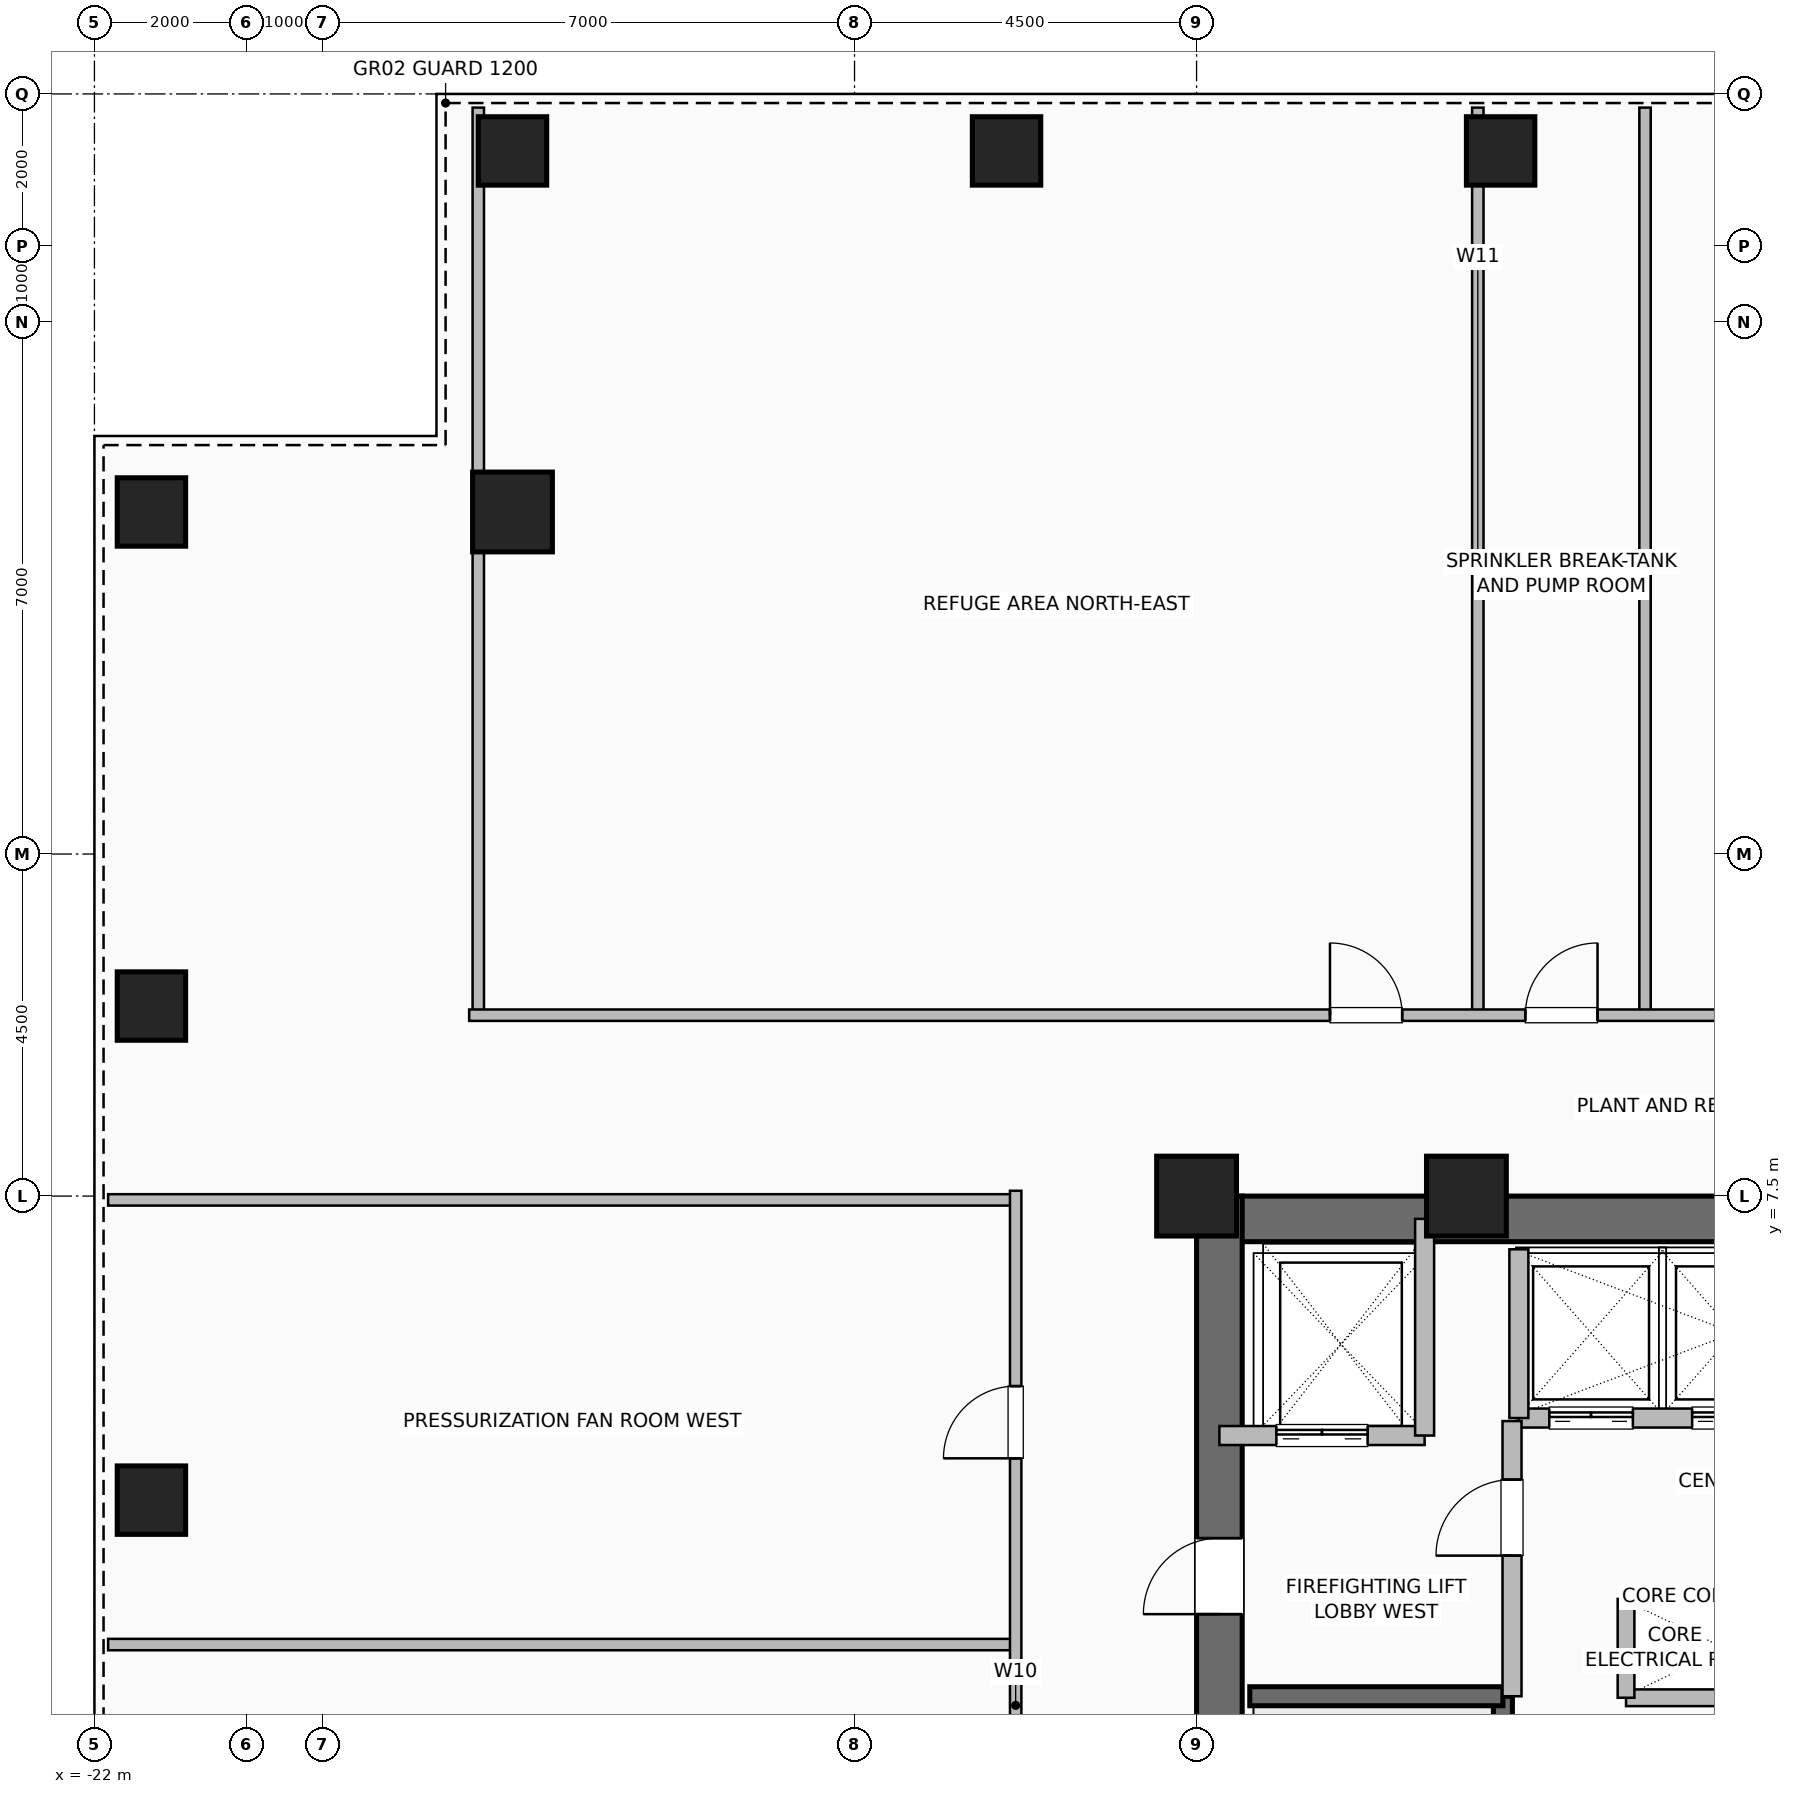
"""IFC4 building model, lengths in metres.
Left out: names, types, materials, properties, quantities, classifications, styles, units other than length and angle.
Written with IfcOpenShell. Run it as: python <this file> out.ifc"""

import sys

from ifc_helpers import new_model, si_unit, direction, frame, frame_2d, origin, origin_2d, place, context, subcontext, project, spatial, rectangle, hollow_rectangle, extrude, element, fill, save


model = new_model("IFC4")
c1 = context("Model", 3, precision=1e-05, world=origin(), true_north=direction((0.0, 1.0)))
c2 = subcontext(c1, "Body", "Model", "MODEL_VIEW")
j1 = project(units=[si_unit("LENGTHUNIT", "METRE"), si_unit("PLANEANGLEUNIT", "RADIAN")], contexts=[c1])
p1 = place(None, origin())
s1 = spatial("IfcSite", under=j1, at=p1, CompositionType="ELEMENT")
p2 = place(p1, origin())
s2 = spatial("IfcBuilding", under=s1, at=p2, CompositionType="ELEMENT")
p3 = place(p2, frame((0.0, 0.0, 160.2)))
s3 = spatial("IfcBuildingStorey", under=s2, at=p3, CompositionType="ELEMENT", Elevation=160.2)
for number, where, z_axis, x_axis in (
    (1, (-3.95, 7.5, 0.0), (0.0, 0.0, 1.0), (1.0, 0.0, 0.0)),
    (2, (-7.5, 7.5, 0.0), (0.0, 0.0, 1.0), (1.0, 0.0, 0.0)),
):
    element("IfcColumn", number, at=place(p3, frame(where, z_axis=z_axis, x_axis=x_axis)), inside=s3, PredefinedType="COLUMN", context=c2, shape_type="SweptSolid", body=[
        extrude(hollow_rectangle(XDim=1.05, YDim=1.05, WallThickness=0.05, at=origin_2d()), origin(), (0.0, 0.0, 1.0), 6.0),
    ])
for number, where, z_axis, x_axis in (
    (3, (-16.5, 21.25, 0.0), (0.0, 0.0, 1.0), (1.0, 0.0, 0.0)),
    (4, (-10.0, 21.25, 0.0), (0.0, 0.0, 1.0), (1.0, 0.0, 0.0)),
    (5, (-3.5, 21.25, 0.0), (0.0, 0.0, 1.0), (1.0, 0.0, 0.0)),
    (6, (-21.25, 3.5, 0.0), (0.0, 0.0, 1.0), (1.0, 0.0, 0.0)),
    (7, (-21.25, 10.0, 0.0), (0.0, 0.0, 1.0), (1.0, 0.0, 0.0)),
    (8, (-21.25, 16.5, 0.0), (0.0, 0.0, 1.0), (1.0, 0.0, 0.0)),
):
    element("IfcColumn", number, at=place(p3, frame(where, z_axis=z_axis, x_axis=x_axis)), inside=s3, PredefinedType="COLUMN", context=c2, shape_type="SweptSolid", body=[
        extrude(hollow_rectangle(XDim=0.9, YDim=0.9, WallThickness=0.045, at=origin_2d()), origin(), (0.0, 0.0, 1.0), 5.6),
    ])
p4 = place(p3, frame((-16.5, 16.5, 0.0), z_axis=(0.0, 0.0, 1.0), x_axis=(1.0, 0.0, 0.0)))
e9 = element("IfcColumn", 9, at=p4, inside=s3, PredefinedType="COLUMN", context=c2, shape_type="SweptSolid", body=[
    extrude(hollow_rectangle(XDim=1.05, YDim=1.05, WallThickness=0.05, at=origin_2d()), origin(), (0.0, 0.0, 1.0), 5.6),
])
p5 = place(p3, frame((-7.5, 7.2, 0.0), z_axis=(0.0, 0.0, 1.0), x_axis=(1.0, 0.0, 0.0)))
e10 = element("IfcWall", 10, at=p5, inside=s3, PredefinedType="SHEAR", context=c2, shape_type="SweptSolid", body=[
    extrude(rectangle(XDim=15.0, YDim=0.6, at=frame_2d((7.5, 0.0))), origin(), (0.0, 0.0, 1.0), 5.6),
])
p6 = place(p3, frame((-7.2, -7.5, 0.0), z_axis=(0.0, 0.0, 1.0), x_axis=(0.0, 1.0, 0.0)))
e11 = element("IfcWall", 11, at=p6, inside=s3, PredefinedType="SHEAR", context=c2, shape_type="SweptSolid", body=[
    extrude(rectangle(XDim=15.0, YDim=0.6, at=frame_2d((7.5, 0.0))), origin(), (0.0, 0.0, 1.0), 5.6),
])
p7 = place(p6, frame((9.5, 0.0, 0.0)))
e12 = element("IfcOpeningElement", 12, at=p7, cuts=e11, PredefinedType="OPENING", context=c2, shape_type="SweptSolid", body=[
    extrude(rectangle(XDim=1.0, YDim=2.08, at=frame_2d((0.5, 1.04))), frame((0.0, 0.31, 0.0), z_axis=(0.0, -1.0, 0.0), x_axis=(1.0, 0.0, 0.0)), (0.0, 0.0, 1.0), 0.62),
])
p8 = place(p3, frame((-3.47, -6.8, 0.0), z_axis=(0.0, 0.0, 1.0), x_axis=(0.0, 1.0, 0.0)))
e13 = element("IfcWall", 13, at=p8, inside=s3, PredefinedType="SHEAR", context=c2, shape_type="SweptSolid", body=[
    extrude(rectangle(XDim=7.72, YDim=0.25, at=frame_2d((3.86, 0.0))), origin(), (0.0, 0.0, 1.0), 5.6),
])
p9 = place(p3, frame((-6.8, 0.92, 0.0), z_axis=(0.0, 0.0, 1.0), x_axis=(1.0, 0.0, 0.0)))
e14 = element("IfcWall", 14, at=p9, inside=s3, PredefinedType="SHEAR", context=c2, shape_type="SweptSolid", body=[
    extrude(rectangle(XDim=3.33, YDim=0.25, at=frame_2d((1.665, 0.0))), origin(), (0.0, 0.0, 1.0), 5.6),
])
for number, where, z_axis, x_axis in (
    (15, (-1.85, 2.2, 0.0), (0.0, 0.0, 1.0), (1.0, 0.0, 0.0)),
    (16, (-1.85, 0.9, 0.0), (0.0, 0.0, 1.0), (1.0, 0.0, 0.0)),
):
    element("IfcWall", number, at=place(p3, frame(where, z_axis=z_axis, x_axis=x_axis)), inside=s3, PredefinedType="PARTITIONING", context=c2, shape_type="SweptSolid", body=[
        extrude(rectangle(XDim=2.6, YDim=0.22, at=frame_2d((1.3, 0.0))), origin(), (0.0, 0.0, 1.0), 5.6),
    ])
p10 = place(p3, frame((-1.85, 0.9, 0.0), z_axis=(0.0, 0.0, 1.0), x_axis=(0.0, 1.0, 0.0)))
e17 = element("IfcWall", 17, at=p10, inside=s3, PredefinedType="PARTITIONING", context=c2, shape_type="SweptSolid", body=[
    extrude(rectangle(XDim=1.3, YDim=0.22, at=frame_2d((0.65, 0.0))), origin(), (0.0, 0.0, 1.0), 5.6),
])
p11 = place(p3, frame((-3.26, 4.58, 0.0), z_axis=(0.0, 0.0, 1.0), x_axis=(1.0, 0.0, 0.0)))
e18 = element("IfcWall", 18, at=p11, inside=s3, PredefinedType="SHEAR", context=c2, shape_type="SweptSolid", body=[
    extrude(rectangle(XDim=5.64, YDim=0.25, at=frame_2d((2.82, 0.0))), origin(), (0.0, 0.0, 1.0), 5.6),
])
p12 = place(p11, frame((0.4, 0.0, 0.0)))
e19 = element("IfcOpeningElement", 19, at=p12, cuts=e18, PredefinedType="OPENING", context=c2, shape_type="SweptSolid", body=[
    extrude(rectangle(XDim=1.1, YDim=2.2, at=frame_2d((0.55, 1.1))), frame((0.0, 0.135, 0.0), z_axis=(0.0, -1.0, 0.0), x_axis=(1.0, 0.0, 0.0)), (0.0, 0.0, 1.0), 0.27),
])
p13 = place(p11, frame((2.28, 0.0, 0.0)))
e20 = element("IfcOpeningElement", 20, at=p13, cuts=e18, PredefinedType="OPENING", context=c2, shape_type="SweptSolid", body=[
    extrude(rectangle(XDim=1.1, YDim=2.2, at=frame_2d((0.55, 1.1))), frame((0.0, 0.135, 0.0), z_axis=(0.0, -1.0, 0.0), x_axis=(1.0, 0.0, 0.0)), (0.0, 0.0, 1.0), 0.27),
])
p14 = place(p11, frame((4.16, 0.0, 0.0)))
e21 = element("IfcOpeningElement", 21, at=p14, cuts=e18, PredefinedType="OPENING", context=c2, shape_type="SweptSolid", body=[
    extrude(rectangle(XDim=1.1, YDim=2.2, at=frame_2d((0.55, 1.1))), frame((0.0, 0.135, 0.0), z_axis=(0.0, -1.0, 0.0), x_axis=(1.0, 0.0, 0.0)), (0.0, 0.0, 1.0), 0.27),
])
p15 = place(p3, frame((-3.26, 4.58, 0.0), z_axis=(0.0, 0.0, 1.0), x_axis=(0.0, 1.0, 0.0)))
e22 = element("IfcWall", 22, at=p15, inside=s3, PredefinedType="SHEAR", context=c2, shape_type="SweptSolid", body=[
    extrude(rectangle(XDim=2.22, YDim=0.25, at=frame_2d((1.11, 0.0))), origin(), (0.0, 0.0, 1.0), 5.6),
])
p16 = place(p3, frame((-7.2, 4.35, 0.0), z_axis=(0.0, 0.0, 1.0), x_axis=(1.0, 0.0, 0.0)))
e23 = element("IfcWall", 23, at=p16, inside=s3, PredefinedType="SHEAR", context=c2, shape_type="SweptSolid", body=[
    extrude(rectangle(XDim=2.7, YDim=0.25, at=frame_2d((1.35, 0.0))), origin(), (0.0, 0.0, 1.0), 5.6),
])
p17 = place(p16, frame((0.75, 0.0, 0.0)))
e24 = element("IfcOpeningElement", 24, at=p17, cuts=e23, PredefinedType="OPENING", context=c2, shape_type="SweptSolid", body=[
    extrude(rectangle(XDim=1.2, YDim=2.2, at=frame_2d((0.6, 1.1))), frame((0.0, 0.135, 0.0), z_axis=(0.0, -1.0, 0.0), x_axis=(1.0, 0.0, 0.0)), (0.0, 0.0, 1.0), 0.27),
])
p18 = place(p3, frame((-4.5, 4.35, 0.0), z_axis=(0.0, 0.0, 1.0), x_axis=(0.0, 1.0, 0.0)))
e25 = element("IfcWall", 25, at=p18, inside=s3, PredefinedType="SHEAR", context=c2, shape_type="SweptSolid", body=[
    extrude(rectangle(XDim=2.85, YDim=0.25, at=frame_2d((1.425, 0.0))), origin(), (0.0, 0.0, 1.0), 5.6),
])
p19 = place(p3, frame((-3.35, 0.92, 0.0), z_axis=(0.0, 0.0, 1.0), x_axis=(0.0, 1.0, 0.0)))
e26 = element("IfcWall", 26, at=p19, inside=s3, PredefinedType="SHEAR", context=c2, shape_type="SweptSolid", body=[
    extrude(rectangle(XDim=3.62, YDim=0.25, at=frame_2d((1.81, 0.0))), origin(), (0.0, 0.0, 1.0), 5.6),
])
p20 = place(p19, frame((1.85, 0.0, 0.0)))
e27 = element("IfcOpeningElement", 27, at=p20, cuts=e26, PredefinedType="OPENING", context=c2, shape_type="SweptSolid", body=[
    extrude(rectangle(XDim=1.0, YDim=2.08, at=frame_2d((0.5, 1.04))), frame((0.0, 0.135, 0.0), z_axis=(0.0, -1.0, 0.0), x_axis=(1.0, 0.0, 0.0)), (0.0, 0.0, 1.0), 0.27),
])
for number, where, z_axis, x_axis in (
    (28, (-16.95, 9.88, 0.0), (0.0, 0.0, 1.0), (0.0, 1.0, 0.0)),
    (29, (-3.8, 9.88, 0.0), (0.0, 0.0, 1.0), (0.0, 1.0, 0.0)),
    (30, (-1.6, 9.88, 0.0), (0.0, 0.0, 1.0), (0.0, 1.0, 0.0)),
):
    element("IfcWall", number, at=place(p3, frame(where, z_axis=z_axis, x_axis=x_axis)), inside=s3, PredefinedType="PARTITIONING", context=c2, shape_type="SweptSolid", body=[
        extrude(rectangle(XDim=11.94, YDim=0.15, at=frame_2d((5.97, 0.0))), origin(), (0.0, 0.0, 1.0), 5.6),
    ])
p21 = place(p3, frame((-17.07, 9.88, 0.0), z_axis=(0.0, 0.0, 1.0), x_axis=(1.0, 0.0, 0.0)))
e31 = element("IfcWall", 31, at=p21, inside=s3, PredefinedType="PARTITIONING", context=c2, shape_type="SweptSolid", body=[
    extrude(rectangle(XDim=34.14, YDim=0.15, at=frame_2d((17.07, 0.0))), origin(), (0.0, 0.0, 1.0), 5.6),
])
p22 = place(p21, frame((11.325, 0.0, 0.0)))
e32 = element("IfcOpeningElement", 32, at=p22, cuts=e31, PredefinedType="OPENING", context=c2, shape_type="SweptSolid", body=[
    extrude(rectangle(XDim=0.95, YDim=2.06, at=frame_2d((0.475, 1.03))), frame((0.0, 0.085, 0.0), z_axis=(0.0, -1.0, 0.0), x_axis=(1.0, 0.0, 0.0)), (0.0, 0.0, 1.0), 0.17),
])
p23 = place(p21, frame((13.895, 0.0, 0.0)))
e33 = element("IfcOpeningElement", 33, at=p23, cuts=e31, PredefinedType="OPENING", context=c2, shape_type="SweptSolid", body=[
    extrude(rectangle(XDim=0.95, YDim=2.06, at=frame_2d((0.475, 1.03))), frame((0.0, 0.085, 0.0), z_axis=(0.0, -1.0, 0.0), x_axis=(1.0, 0.0, 0.0)), (0.0, 0.0, 1.0), 0.17),
])
p24 = place(p21, frame((19.045, 0.0, 0.0)))
e34 = element("IfcOpeningElement", 34, at=p24, cuts=e31, PredefinedType="OPENING", context=c2, shape_type="SweptSolid", body=[
    extrude(rectangle(XDim=0.95, YDim=2.06, at=frame_2d((0.475, 1.03))), frame((0.0, 0.085, 0.0), z_axis=(0.0, -1.0, 0.0), x_axis=(1.0, 0.0, 0.0)), (0.0, 0.0, 1.0), 0.17),
])
p25 = place(p3, frame((-21.82, 1.6, 0.0), z_axis=(0.0, 0.0, 1.0), x_axis=(1.0, 0.0, 0.0)))
e35 = element("IfcWall", 35, at=p25, inside=s3, PredefinedType="PARTITIONING", context=c2, shape_type="SweptSolid", body=[
    extrude(rectangle(XDim=11.94, YDim=0.15, at=frame_2d((5.97, 0.0))), origin(), (0.0, 0.0, 1.0), 5.6),
])
p26 = place(p3, frame((-21.82, 7.45, 0.0), z_axis=(0.0, 0.0, 1.0), x_axis=(1.0, 0.0, 0.0)))
e36 = element("IfcWall", 36, at=p26, inside=s3, PredefinedType="PARTITIONING", context=c2, shape_type="SweptSolid", body=[
    extrude(rectangle(XDim=11.94, YDim=0.15, at=frame_2d((5.97, 0.0))), origin(), (0.0, 0.0, 1.0), 3.975),
])
p27 = place(p3, frame((-9.88, -7.57, 0.0), z_axis=(0.0, 0.0, 1.0), x_axis=(0.0, 1.0, 0.0)))
e37 = element("IfcWall", 37, at=p27, inside=s3, PredefinedType="PARTITIONING", context=c2, shape_type="SweptSolid", body=[
    extrude(rectangle(XDim=15.14, YDim=0.15, at=frame_2d((7.57, 0.0))), origin(), (0.0, 0.0, 1.0), 5.6),
])
p28 = place(p27, frame((4.17, 0.0, 0.0)))
e38 = element("IfcOpeningElement", 38, at=p28, cuts=e37, PredefinedType="OPENING", context=c2, shape_type="SweptSolid", body=[
    extrude(rectangle(XDim=0.95, YDim=2.06, at=frame_2d((0.475, 1.03))), frame((0.0, 0.085, 0.0), z_axis=(0.0, -1.0, 0.0), x_axis=(1.0, 0.0, 0.0)), (0.0, 0.0, 1.0), 0.17),
])
p29 = place(p27, frame((11.62, 0.0, 0.0)))
e39 = element("IfcOpeningElement", 39, at=p29, cuts=e37, PredefinedType="OPENING", context=c2, shape_type="SweptSolid", body=[
    extrude(rectangle(XDim=0.95, YDim=2.06, at=frame_2d((0.475, 1.03))), frame((0.0, 0.085, 0.0), z_axis=(0.0, -1.0, 0.0), x_axis=(1.0, 0.0, 0.0)), (0.0, 0.0, 1.0), 0.17),
])
p30 = place(p7, origin())
e40 = element("IfcDoor", 40, at=p30, inside=s3, OperationType="SINGLE_SWING_LEFT", PredefinedType="DOOR", context=c2, shape_type="SweptSolid", body=[
    extrude(rectangle(XDim=1.0, YDim=2.08, at=frame_2d((0.5, 1.04))), frame((0.0, 0.025, 0.0), z_axis=(0.0, -1.0, 0.0), x_axis=(1.0, 0.0, 0.0)), (0.0, 0.0, 1.0), 0.05),
])
fill(e12, e40)
p31 = place(p12, origin())
e41 = element("IfcDoor", 41, at=p31, inside=s3, OperationType="DOUBLE_DOOR_SLIDING", PredefinedType="DOOR", context=c2, shape_type="SweptSolid", body=[
    extrude(rectangle(XDim=1.1, YDim=2.2, at=frame_2d((0.55, 1.1))), frame((0.0, 0.025, 0.0), z_axis=(0.0, -1.0, 0.0), x_axis=(1.0, 0.0, 0.0)), (0.0, 0.0, 1.0), 0.05),
])
fill(e19, e41)
p32 = place(p13, origin())
e42 = element("IfcDoor", 42, at=p32, inside=s3, OperationType="DOUBLE_DOOR_SLIDING", PredefinedType="DOOR", context=c2, shape_type="SweptSolid", body=[
    extrude(rectangle(XDim=1.1, YDim=2.2, at=frame_2d((0.55, 1.1))), frame((0.0, 0.025, 0.0), z_axis=(0.0, -1.0, 0.0), x_axis=(1.0, 0.0, 0.0)), (0.0, 0.0, 1.0), 0.05),
])
fill(e20, e42)
p33 = place(p17, origin())
e43 = element("IfcDoor", 43, at=p33, inside=s3, OperationType="DOUBLE_DOOR_SLIDING", PredefinedType="DOOR", context=c2, shape_type="SweptSolid", body=[
    extrude(rectangle(XDim=1.2, YDim=2.2, at=frame_2d((0.6, 1.1))), frame((0.0, 0.025, 0.0), z_axis=(0.0, -1.0, 0.0), x_axis=(1.0, 0.0, 0.0)), (0.0, 0.0, 1.0), 0.05),
])
fill(e24, e43)
p34 = place(p20, origin())
e44 = element("IfcDoor", 44, at=p34, inside=s3, OperationType="SINGLE_SWING_LEFT", PredefinedType="DOOR", context=c2, shape_type="SweptSolid", body=[
    extrude(rectangle(XDim=1.0, YDim=2.08, at=frame_2d((0.5, 1.04))), frame((0.0, 0.025, 0.0), z_axis=(0.0, -1.0, 0.0), x_axis=(1.0, 0.0, 0.0)), (0.0, 0.0, 1.0), 0.05),
])
fill(e27, e44)
p35 = place(p22, origin())
e45 = element("IfcDoor", 45, at=p35, inside=s3, OperationType="SINGLE_SWING_LEFT", PredefinedType="DOOR", context=c2, shape_type="SweptSolid", body=[
    extrude(rectangle(XDim=0.95, YDim=2.06, at=frame_2d((0.475, 1.03))), frame((0.0, 0.025, 0.0), z_axis=(0.0, -1.0, 0.0), x_axis=(1.0, 0.0, 0.0)), (0.0, 0.0, 1.0), 0.05),
])
fill(e32, e45)
p36 = place(p23, origin())
e46 = element("IfcDoor", 46, at=p36, inside=s3, OperationType="SINGLE_SWING_RIGHT", PredefinedType="DOOR", context=c2, shape_type="SweptSolid", body=[
    extrude(rectangle(XDim=0.95, YDim=2.06, at=frame_2d((0.475, 1.03))), frame((0.0, 0.025, 0.0), z_axis=(0.0, -1.0, 0.0), x_axis=(1.0, 0.0, 0.0)), (0.0, 0.0, 1.0), 0.05),
])
fill(e33, e46)
p37 = place(p29, origin())
e47 = element("IfcDoor", 47, at=p37, inside=s3, OperationType="SINGLE_SWING_LEFT", PredefinedType="DOOR", context=c2, shape_type="SweptSolid", body=[
    extrude(rectangle(XDim=0.95, YDim=2.06, at=frame_2d((0.475, 1.03))), frame((0.0, 0.025, 0.0), z_axis=(0.0, -1.0, 0.0), x_axis=(1.0, 0.0, 0.0)), (0.0, 0.0, 1.0), 0.05),
])
fill(e39, e47)
save(model, sys.argv[1])
